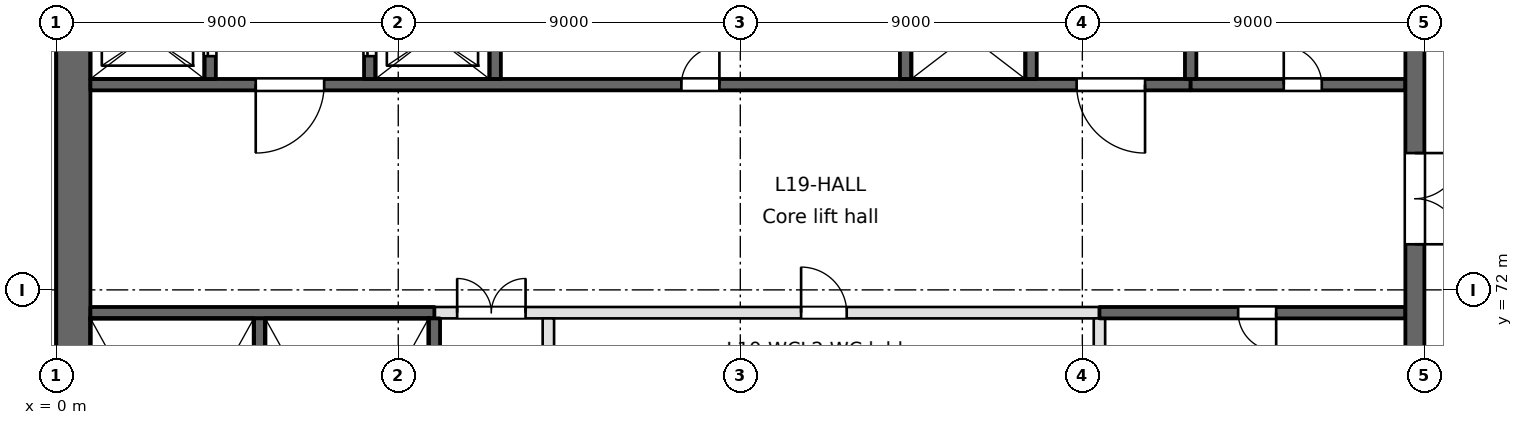
"""IFC4 building model, lengths in metres.
Left out: names, types, materials, properties, quantities, classifications, styles, units other than length and angle.
Written with IfcOpenShell. Run it as: python <this file> out.ifc"""

import sys

from ifc_helpers import new_model, si_unit, direction, frame, frame_2d, origin, place, context, subcontext, project, spatial, rectangle, extrude, element, fill, save


model = new_model("IFC4")
c1 = context("Model", 3, precision=1e-05, world=origin(), true_north=direction((0.0, 1.0)))
c2 = subcontext(c1, "Body", "Model", "MODEL_VIEW")
j1 = project(units=[si_unit("LENGTHUNIT", "METRE"), si_unit("PLANEANGLEUNIT", "RADIAN")], contexts=[c1])
p1 = place(None, origin())
s1 = spatial("IfcSite", under=j1, at=p1, CompositionType="ELEMENT")
p2 = place(p1, origin())
s2 = spatial("IfcBuilding", under=s1, at=p2, CompositionType="ELEMENT")
p3 = place(p2, frame((0.0, 0.0, 80.2)))
s3 = spatial("IfcBuildingStorey", under=s2, at=p3, CompositionType="ELEMENT", Elevation=80.2)
p4 = place(p3, frame((0.45, 94.5, 0.0), z_axis=(0.0, 0.0, 1.0), x_axis=(0.0, -1.0, 0.0)))
e1 = element("IfcWall", 1, at=p4, inside=s3, PredefinedType="SHEAR", context=c2, shape_type="SweptSolid", body=[
    extrude(rectangle(XDim=66.187, YDim=0.9, at=frame_2d((33.094, 0.0))), origin(), (0.0, 0.0, 1.0), 4.6),
])
p5 = place(p3, frame((0.9, 71.4, -0.45), z_axis=(0.0, 0.0, 1.0), x_axis=(1.0, 0.0, 0.0)))
e2 = element("IfcWall", 2, at=p5, inside=s3, PredefinedType="SOLIDWALL", context=c2, shape_type="SweptSolid", body=[
    extrude(rectangle(XDim=9.05, YDim=0.3, at=frame_2d((4.525, 0.0))), origin(), (0.0, 0.0, 1.0), 4.65),
])
p6 = place(p3, frame((9.95, 71.4, 0.0), z_axis=(0.0, 0.0, 1.0), x_axis=(1.0, 0.0, 0.0)))
e3 = element("IfcWall", 3, at=p6, inside=s3, PredefinedType="PARTITIONING", context=c2, shape_type="SweptSolid", body=[
    extrude(rectangle(XDim=17.5, YDim=0.3, at=frame_2d((8.75, 0.0))), origin(), (0.0, 0.0, 1.0), 4.2),
])
p7 = place(p6, frame((0.6, 0.0, 0.0)))
e4 = element("IfcOpeningElement", 4, at=p7, cuts=e3, PredefinedType="OPENING", context=c2, shape_type="SweptSolid", body=[
    extrude(rectangle(XDim=1.8, YDim=2.1, at=frame_2d((0.9, 1.05))), frame((0.0, 0.15, 0.0), z_axis=(0.0, -1.0, 0.0), x_axis=(1.0, 0.0, 0.0)), (0.0, 0.0, 1.0), 0.3),
])
p8 = place(p6, frame((9.65, 0.0, 0.0)))
e5 = element("IfcOpeningElement", 5, at=p8, cuts=e3, PredefinedType="OPENING", context=c2, shape_type="SweptSolid", body=[
    extrude(rectangle(XDim=1.2, YDim=2.1, at=frame_2d((0.6, 1.05))), frame((0.0, 0.15, 0.0), z_axis=(0.0, -1.0, 0.0), x_axis=(1.0, 0.0, 0.0)), (0.0, 0.0, 1.0), 0.3),
])
p9 = place(p3, frame((27.45, 71.4, 0.0), z_axis=(0.0, 0.0, 1.0), x_axis=(1.0, 0.0, 0.0)))
e6 = element("IfcWall", 6, at=p9, inside=s3, PredefinedType="SOLIDWALL", context=c2, shape_type="SweptSolid", body=[
    extrude(rectangle(XDim=8.05, YDim=0.3, at=frame_2d((4.025, 0.0))), origin(), (0.0, 0.0, 1.0), 4.2),
])
p10 = place(p9, frame((3.65, 0.0, 0.0)))
e7 = element("IfcOpeningElement", 7, at=p10, cuts=e6, PredefinedType="OPENING", context=c2, shape_type="SweptSolid", body=[
    extrude(rectangle(XDim=1.0, YDim=2.1, at=frame_2d((0.5, 1.05))), frame((0.0, 0.15, 0.0), z_axis=(0.0, -1.0, 0.0), x_axis=(1.0, 0.0, 0.0)), (0.0, 0.0, 1.0), 0.3),
])
p11 = place(p3, frame((0.9, 77.4, -0.45), z_axis=(0.0, 0.0, 1.0), x_axis=(1.0, 0.0, 0.0)))
e8 = element("IfcWall", 8, at=p11, inside=s3, PredefinedType="SOLIDWALL", context=c2, shape_type="SweptSolid", body=[
    extrude(rectangle(XDim=28.95, YDim=0.3, at=frame_2d((14.475, 0.0))), origin(), (0.0, 0.0, 1.0), 4.65),
])
p12 = place(p11, frame((4.35, 0.0, 0.45)))
e9 = element("IfcOpeningElement", 9, at=p12, cuts=e8, PredefinedType="OPENING", context=c2, shape_type="SweptSolid", body=[
    extrude(rectangle(XDim=1.8, YDim=2.1, at=frame_2d((0.9, 1.05))), frame((0.0, 0.15, 0.0), z_axis=(0.0, -1.0, 0.0), x_axis=(1.0, 0.0, 0.0)), (0.0, 0.0, 1.0), 0.3),
])
p13 = place(p11, frame((25.95, 0.0, 0.45)))
e10 = element("IfcOpeningElement", 10, at=p13, cuts=e8, PredefinedType="OPENING", context=c2, shape_type="SweptSolid", body=[
    extrude(rectangle(XDim=1.8, YDim=2.1, at=frame_2d((0.9, 1.05))), frame((0.0, 0.15, 0.0), z_axis=(0.0, -1.0, 0.0), x_axis=(1.0, 0.0, 0.0)), (0.0, 0.0, 1.0), 0.3),
])
p14 = place(p11, frame((15.55, 0.0, 0.45)))
e11 = element("IfcOpeningElement", 11, at=p14, cuts=e8, PredefinedType="OPENING", context=c2, shape_type="SweptSolid", body=[
    extrude(rectangle(XDim=1.0, YDim=2.1, at=frame_2d((0.5, 1.05))), frame((0.0, 0.15, 0.0), z_axis=(0.0, -1.0, 0.0), x_axis=(1.0, 0.0, 0.0)), (0.0, 0.0, 1.0), 0.3),
])
p15 = place(p3, frame((29.85, 77.4, 0.0), z_axis=(0.0, 0.0, 1.0), x_axis=(1.0, 0.0, 0.0)))
e12 = element("IfcWall", 12, at=p15, inside=s3, PredefinedType="SOLIDWALL", context=c2, shape_type="SweptSolid", body=[
    extrude(rectangle(XDim=5.65, YDim=0.3, at=frame_2d((2.825, 0.0))), origin(), (0.0, 0.0, 1.0), 4.2),
])
p16 = place(p15, frame((2.45, 0.0, 0.0)))
e13 = element("IfcOpeningElement", 13, at=p16, cuts=e12, PredefinedType="OPENING", context=c2, shape_type="SweptSolid", body=[
    extrude(rectangle(XDim=1.0, YDim=2.1, at=frame_2d((0.5, 1.05))), frame((0.0, 0.15, 0.0), z_axis=(0.0, -1.0, 0.0), x_axis=(1.0, 0.0, 0.0)), (0.0, 0.0, 1.0), 0.3),
])
p17 = place(p3, frame((4.05, 77.55, -0.45), z_axis=(0.0, 0.0, 1.0), x_axis=(0.0, 1.0, 0.0)))
e14 = element("IfcWall", 14, at=p17, inside=s3, PredefinedType="SOLIDWALL", context=c2, shape_type="SweptSolid", body=[
    extrude(rectangle(XDim=10.1, YDim=0.3, at=frame_2d((5.05, 0.0))), origin(), (0.0, 0.0, 1.0), 4.65),
])
p18 = place(p17, frame((0.6, 0.0, 0.45)))
e15 = element("IfcOpeningElement", 15, at=p18, cuts=e14, PredefinedType="OPENING", context=c2, shape_type="SweptSolid", body=[
    extrude(rectangle(XDim=1.1, YDim=2.1, at=frame_2d((0.55, 1.05))), frame((0.0, 0.15, 0.0), z_axis=(0.0, -1.0, 0.0), x_axis=(1.0, 0.0, 0.0)), (0.0, 0.0, 1.0), 0.3),
])
p19 = place(p17, frame((3.2, 0.0, 0.45)))
e16 = element("IfcOpeningElement", 16, at=p19, cuts=e14, PredefinedType="OPENING", context=c2, shape_type="SweptSolid", body=[
    extrude(rectangle(XDim=1.1, YDim=2.1, at=frame_2d((0.55, 1.05))), frame((0.0, 0.15, 0.0), z_axis=(0.0, -1.0, 0.0), x_axis=(1.0, 0.0, 0.0)), (0.0, 0.0, 1.0), 0.3),
])
p20 = place(p17, frame((5.8, 0.0, 0.45)))
e17 = element("IfcOpeningElement", 17, at=p20, cuts=e14, PredefinedType="OPENING", context=c2, shape_type="SweptSolid", body=[
    extrude(rectangle(XDim=1.1, YDim=2.1, at=frame_2d((0.55, 1.05))), frame((0.0, 0.15, 0.0), z_axis=(0.0, -1.0, 0.0), x_axis=(1.0, 0.0, 0.0)), (0.0, 0.0, 1.0), 0.3),
])
p21 = place(p17, frame((8.4, 0.0, 0.45)))
e18 = element("IfcOpeningElement", 18, at=p21, cuts=e14, PredefinedType="OPENING", context=c2, shape_type="SweptSolid", body=[
    extrude(rectangle(XDim=1.1, YDim=2.1, at=frame_2d((0.55, 1.05))), frame((0.0, 0.15, 0.0), z_axis=(0.0, -1.0, 0.0), x_axis=(1.0, 0.0, 0.0)), (0.0, 0.0, 1.0), 0.3),
])
p22 = place(p3, frame((5.35, 63.5, -0.45), z_axis=(0.0, 0.0, 1.0), x_axis=(0.0, 1.0, 0.0)))
e19 = element("IfcWall", 19, at=p22, inside=s3, PredefinedType="SOLIDWALL", context=c2, shape_type="SweptSolid", body=[
    extrude(rectangle(XDim=7.75, YDim=0.3, at=frame_2d((3.875, 0.0))), origin(), (0.0, 0.0, 1.0), 4.65),
])
p23 = place(p3, frame((8.25, 77.55, -0.45), z_axis=(0.0, 0.0, 1.0), x_axis=(0.0, 1.0, 0.0)))
e20 = element("IfcWall", 20, at=p23, inside=s3, PredefinedType="SOLIDWALL", context=c2, shape_type="SweptSolid", body=[
    extrude(rectangle(XDim=10.1, YDim=0.3, at=frame_2d((5.05, 0.0))), origin(), (0.0, 0.0, 1.0), 4.65),
])
p24 = place(p23, frame((0.6, 0.0, 0.45)))
e21 = element("IfcOpeningElement", 21, at=p24, cuts=e20, PredefinedType="OPENING", context=c2, shape_type="SweptSolid", body=[
    extrude(rectangle(XDim=1.1, YDim=2.1, at=frame_2d((0.55, 1.05))), frame((0.0, 0.15, 0.0), z_axis=(0.0, -1.0, 0.0), x_axis=(1.0, 0.0, 0.0)), (0.0, 0.0, 1.0), 0.3),
])
p25 = place(p23, frame((3.2, 0.0, 0.45)))
e22 = element("IfcOpeningElement", 22, at=p25, cuts=e20, PredefinedType="OPENING", context=c2, shape_type="SweptSolid", body=[
    extrude(rectangle(XDim=1.1, YDim=2.1, at=frame_2d((0.55, 1.05))), frame((0.0, 0.15, 0.0), z_axis=(0.0, -1.0, 0.0), x_axis=(1.0, 0.0, 0.0)), (0.0, 0.0, 1.0), 0.3),
])
p26 = place(p23, frame((5.8, 0.0, 0.45)))
e23 = element("IfcOpeningElement", 23, at=p26, cuts=e20, PredefinedType="OPENING", context=c2, shape_type="SweptSolid", body=[
    extrude(rectangle(XDim=1.1, YDim=2.1, at=frame_2d((0.55, 1.05))), frame((0.0, 0.15, 0.0), z_axis=(0.0, -1.0, 0.0), x_axis=(1.0, 0.0, 0.0)), (0.0, 0.0, 1.0), 0.3),
])
p27 = place(p23, frame((8.4, 0.0, 0.45)))
e24 = element("IfcOpeningElement", 24, at=p27, cuts=e20, PredefinedType="OPENING", context=c2, shape_type="SweptSolid", body=[
    extrude(rectangle(XDim=1.1, YDim=2.1, at=frame_2d((0.55, 1.05))), frame((0.0, 0.15, 0.0), z_axis=(0.0, -1.0, 0.0), x_axis=(1.0, 0.0, 0.0)), (0.0, 0.0, 1.0), 0.3),
])
p28 = place(p3, frame((9.95, 63.5, -0.45), z_axis=(0.0, 0.0, 1.0), x_axis=(0.0, 1.0, 0.0)))
e25 = element("IfcWall", 25, at=p28, inside=s3, PredefinedType="SOLIDWALL", context=c2, shape_type="SweptSolid", body=[
    extrude(rectangle(XDim=7.75, YDim=0.3, at=frame_2d((3.875, 0.0))), origin(), (0.0, 0.0, 1.0), 4.65),
])
p29 = place(p3, frame((11.55, 77.55, -0.45), z_axis=(0.0, 0.0, 1.0), x_axis=(0.0, 1.0, 0.0)))
e26 = element("IfcWall", 26, at=p29, inside=s3, PredefinedType="SOLIDWALL", context=c2, shape_type="SweptSolid", body=[
    extrude(rectangle(XDim=10.1, YDim=0.3, at=frame_2d((5.05, 0.0))), origin(), (0.0, 0.0, 1.0), 4.65),
])
p30 = place(p3, frame((12.95, 63.5, 0.0), z_axis=(0.0, 0.0, 1.0), x_axis=(0.0, 1.0, 0.0)))
e27 = element("IfcWall", 27, at=p30, inside=s3, PredefinedType="PARTITIONING", context=c2, shape_type="SweptSolid", body=[
    extrude(rectangle(XDim=7.75, YDim=0.3, at=frame_2d((3.875, 0.0))), origin(), (0.0, 0.0, 1.0), 4.2),
])
for number, where, z_axis, x_axis in (
    (28, (22.35, 77.55, -0.45), (0.0, 0.0, 1.0), (0.0, 1.0, 0.0)),
    (29, (25.65, 77.55, -0.45), (0.0, 0.0, 1.0), (0.0, 1.0, 0.0)),
):
    element("IfcWall", number, at=place(p3, frame(where, z_axis=z_axis, x_axis=x_axis)), inside=s3, PredefinedType="SOLIDWALL", context=c2, shape_type="SweptSolid", body=[
        extrude(rectangle(XDim=10.1, YDim=0.3, at=frame_2d((5.05, 0.0))), origin(), (0.0, 0.0, 1.0), 4.65),
    ])
p31 = place(p3, frame((27.45, 68.05, 0.0), z_axis=(0.0, 0.0, 1.0), x_axis=(0.0, 1.0, 0.0)))
e30 = element("IfcWall", 30, at=p31, inside=s3, PredefinedType="PARTITIONING", context=c2, shape_type="SweptSolid", body=[
    extrude(rectangle(XDim=3.2, YDim=0.3, at=frame_2d((1.6, 0.0))), origin(), (0.0, 0.0, 1.0), 4.2),
])
p32 = place(p3, frame((29.85, 77.55, -0.45), z_axis=(0.0, 0.0, 1.0), x_axis=(0.0, 1.0, 0.0)))
e31 = element("IfcWall", 31, at=p32, inside=s3, PredefinedType="SOLIDWALL", context=c2, shape_type="SweptSolid", body=[
    extrude(rectangle(XDim=10.1, YDim=0.3, at=frame_2d((5.05, 0.0))), origin(), (0.0, 0.0, 1.0), 4.65),
])
p33 = place(p3, frame((35.75, 63.5, -0.45), z_axis=(0.0, 0.0, 1.0), x_axis=(0.0, 1.0, 0.0)))
e32 = element("IfcWall", 32, at=p33, inside=s3, PredefinedType="SOLIDWALL", context=c2, shape_type="SweptSolid", body=[
    extrude(rectangle(XDim=34.6, YDim=0.5, at=frame_2d((17.3, 0.0))), origin(), (0.0, 0.0, 1.0), 4.65),
])
p34 = place(p33, frame((9.7, 0.0, 0.45)))
e33 = element("IfcOpeningElement", 33, at=p34, cuts=e32, PredefinedType="OPENING", context=c2, shape_type="SweptSolid", body=[
    extrude(rectangle(XDim=2.4, YDim=2.1, at=frame_2d((1.2, 1.05))), frame((0.0, 0.25, 0.0), z_axis=(0.0, -1.0, 0.0), x_axis=(1.0, 0.0, 0.0)), (0.0, 0.0, 1.0), 0.5),
])
p35 = place(p33, frame((27.9, 0.0, 0.45)))
e34 = element("IfcOpeningElement", 34, at=p35, cuts=e32, PredefinedType="OPENING", context=c2, shape_type="SweptSolid", body=[
    extrude(rectangle(XDim=1.5, YDim=2.1, at=frame_2d((0.75, 1.05))), frame((0.0, 0.25, 0.0), z_axis=(0.0, -1.0, 0.0), x_axis=(1.0, 0.0, 0.0)), (0.0, 0.0, 1.0), 0.5),
])
p36 = place(p33, frame((1.5, 0.0, 0.45)))
e35 = element("IfcOpeningElement", 35, at=p36, cuts=e32, PredefinedType="OPENING", context=c2, shape_type="SweptSolid", body=[
    extrude(rectangle(XDim=1.2, YDim=2.1, at=frame_2d((0.6, 1.05))), frame((0.0, 0.25, 0.0), z_axis=(0.0, -1.0, 0.0), x_axis=(1.0, 0.0, 0.0)), (0.0, 0.0, 1.0), 0.5),
])
p37 = place(p18, origin())
e36 = element("IfcDoor", 36, at=p37, inside=s3, OperationType="SLIDING_TO_RIGHT", PredefinedType="DOOR", context=c2, shape_type="SweptSolid", body=[
    extrude(rectangle(XDim=1.1, YDim=2.1, at=frame_2d((0.55, 1.05))), frame((0.0, 0.025, 0.0), z_axis=(0.0, -1.0, 0.0), x_axis=(1.0, 0.0, 0.0)), (0.0, 0.0, 1.0), 0.05),
])
fill(e15, e36)
p38 = place(p24, origin())
e37 = element("IfcDoor", 37, at=p38, inside=s3, OperationType="SLIDING_TO_RIGHT", PredefinedType="DOOR", context=c2, shape_type="SweptSolid", body=[
    extrude(rectangle(XDim=1.1, YDim=2.1, at=frame_2d((0.55, 1.05))), frame((0.0, 0.025, 0.0), z_axis=(0.0, -1.0, 0.0), x_axis=(1.0, 0.0, 0.0)), (0.0, 0.0, 1.0), 0.05),
])
fill(e21, e37)
p39 = place(p12, frame((1.8, 0.0, 0.0), z_axis=(0.0, 0.0, 1.0), x_axis=(-1.0, 0.0, 0.0)))
e38 = element("IfcDoor", 38, at=p39, inside=s3, OperationType="SINGLE_SWING_RIGHT", PredefinedType="DOOR", context=c2, shape_type="SweptSolid", body=[
    extrude(rectangle(XDim=1.8, YDim=2.1, at=frame_2d((0.9, 1.05))), frame((0.0, 0.025, 0.0), z_axis=(0.0, -1.0, 0.0), x_axis=(1.0, 0.0, 0.0)), (0.0, 0.0, 1.0), 0.05),
])
fill(e9, e38)
p40 = place(p13, frame((1.8, 0.0, 0.0), z_axis=(0.0, 0.0, 1.0), x_axis=(-1.0, 0.0, 0.0)))
e39 = element("IfcDoor", 39, at=p40, inside=s3, OperationType="SINGLE_SWING_LEFT", PredefinedType="DOOR", context=c2, shape_type="SweptSolid", body=[
    extrude(rectangle(XDim=1.8, YDim=2.1, at=frame_2d((0.9, 1.05))), frame((0.0, 0.025, 0.0), z_axis=(0.0, -1.0, 0.0), x_axis=(1.0, 0.0, 0.0)), (0.0, 0.0, 1.0), 0.05),
])
fill(e10, e39)
p41 = place(p34, frame((2.4, 0.0, 0.0), z_axis=(0.0, 0.0, 1.0), x_axis=(-1.0, 0.0, 0.0)))
e40 = element("IfcDoor", 40, at=p41, inside=s3, OperationType="DOUBLE_DOOR_SINGLE_SWING", PredefinedType="DOOR", context=c2, shape_type="SweptSolid", body=[
    extrude(rectangle(XDim=2.4, YDim=2.1, at=frame_2d((1.2, 1.05))), frame((0.0, 0.025, 0.0), z_axis=(0.0, -1.0, 0.0), x_axis=(1.0, 0.0, 0.0)), (0.0, 0.0, 1.0), 0.05),
])
fill(e33, e40)
p42 = place(p7, origin())
e41 = element("IfcDoor", 41, at=p42, inside=s3, OperationType="DOUBLE_DOOR_SINGLE_SWING", PredefinedType="DOOR", context=c2, shape_type="SweptSolid", body=[
    extrude(rectangle(XDim=1.8, YDim=2.1, at=frame_2d((0.9, 1.05))), frame((0.0, 0.025, 0.0), z_axis=(0.0, -1.0, 0.0), x_axis=(1.0, 0.0, 0.0)), (0.0, 0.0, 1.0), 0.05),
])
fill(e4, e41)
p43 = place(p8, origin())
e42 = element("IfcDoor", 42, at=p43, inside=s3, OperationType="SINGLE_SWING_LEFT", PredefinedType="DOOR", context=c2, shape_type="SweptSolid", body=[
    extrude(rectangle(XDim=1.2, YDim=2.1, at=frame_2d((0.6, 1.05))), frame((0.0, 0.025, 0.0), z_axis=(0.0, -1.0, 0.0), x_axis=(1.0, 0.0, 0.0)), (0.0, 0.0, 1.0), 0.05),
])
fill(e5, e42)
p44 = place(p10, frame((1.0, 0.0, 0.0), z_axis=(0.0, 0.0, 1.0), x_axis=(-1.0, 0.0, 0.0)))
e43 = element("IfcDoor", 43, at=p44, inside=s3, OperationType="SINGLE_SWING_LEFT", PredefinedType="DOOR", context=c2, shape_type="SweptSolid", body=[
    extrude(rectangle(XDim=1.0, YDim=2.1, at=frame_2d((0.5, 1.05))), frame((0.0, 0.025, 0.0), z_axis=(0.0, -1.0, 0.0), x_axis=(1.0, 0.0, 0.0)), (0.0, 0.0, 1.0), 0.05),
])
fill(e7, e43)
p45 = place(p14, origin())
e44 = element("IfcDoor", 44, at=p45, inside=s3, OperationType="SINGLE_SWING_RIGHT", PredefinedType="DOOR", context=c2, shape_type="SweptSolid", body=[
    extrude(rectangle(XDim=1.0, YDim=2.1, at=frame_2d((0.5, 1.05))), frame((0.0, 0.025, 0.0), z_axis=(0.0, -1.0, 0.0), x_axis=(1.0, 0.0, 0.0)), (0.0, 0.0, 1.0), 0.05),
])
fill(e11, e44)
p46 = place(p16, origin())
e45 = element("IfcDoor", 45, at=p46, inside=s3, OperationType="SINGLE_SWING_LEFT", PredefinedType="DOOR", context=c2, shape_type="SweptSolid", body=[
    extrude(rectangle(XDim=1.0, YDim=2.1, at=frame_2d((0.5, 1.05))), frame((0.0, 0.025, 0.0), z_axis=(0.0, -1.0, 0.0), x_axis=(1.0, 0.0, 0.0)), (0.0, 0.0, 1.0), 0.05),
])
fill(e13, e45)
save(model, sys.argv[1])
